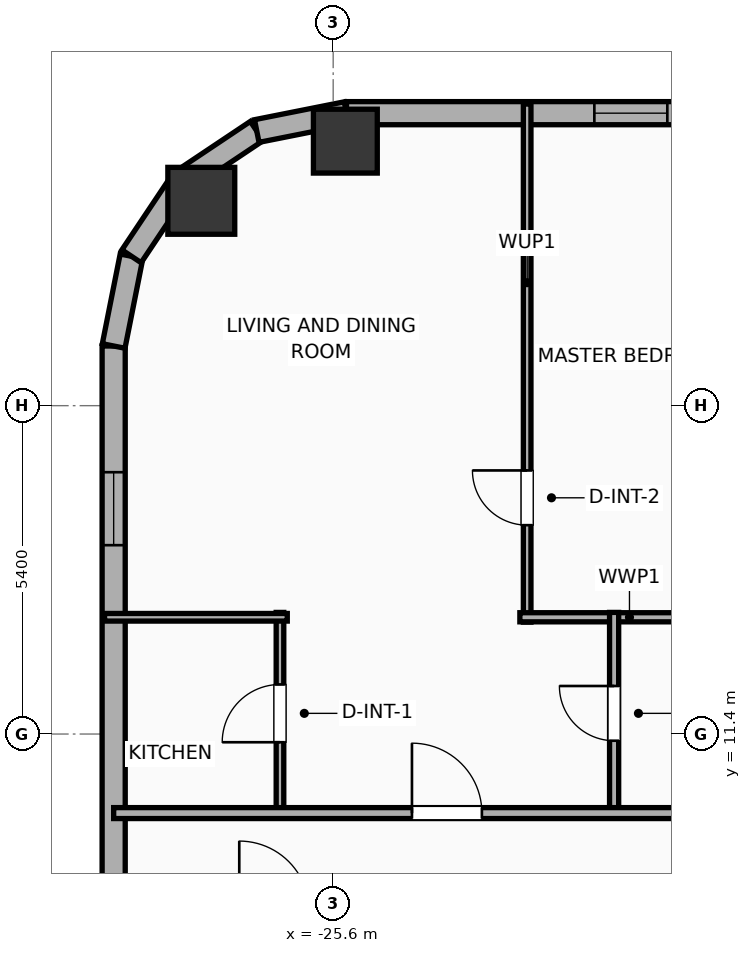
"""IFC4 building model, lengths in metres.
Left out: names, types, materials, properties, quantities, classifications, styles, units other than length and angle.
Written with IfcOpenShell. Run it as: python <this file> out.ifc"""

import sys

from ifc_helpers import new_model, si_unit, direction, frame, frame_2d, origin, origin_2d, place, context, subcontext, project, spatial, rectangle, hollow_rectangle, hollow_circle, extrude, element, fill, save


model = new_model("IFC4")
c1 = context("Model", 3, precision=1e-05, world=origin(), true_north=direction((0.0, 1.0)))
c2 = subcontext(c1, "Body", "Model", "MODEL_VIEW")
j1 = project(units=[si_unit("LENGTHUNIT", "METRE"), si_unit("PLANEANGLEUNIT", "RADIAN")], contexts=[c1])
p1 = place(None, origin())
s1 = spatial("IfcSite", under=j1, at=p1, CompositionType="ELEMENT")
p2 = place(p1, origin())
s2 = spatial("IfcBuilding", under=s1, at=p2, CompositionType="ELEMENT")
p3 = place(p2, frame((0.0, 0.0, 97.5)))
s3 = spatial("IfcBuildingStorey", under=s2, at=p3, CompositionType="ELEMENT", Elevation=97.5)
p4 = place(p3, frame((-25.4, 21.15, 0.0), z_axis=(0.0, 0.0, 1.0), x_axis=(1.0, 0.0, 0.0)))
e1 = element("IfcColumn", 1, at=p4, inside=s3, PredefinedType="COLUMN", context=c2, shape_type="SweptSolid", body=[
    extrude(hollow_rectangle(XDim=1.05, YDim=1.05, WallThickness=0.036, at=origin_2d()), origin(), (0.0, 0.0, 1.0), 3.9),
])
p5 = place(p3, frame((-27.769, 20.169, 0.0), z_axis=(0.0, 0.0, 1.0), x_axis=(1.0, 0.0, 0.0)))
e2 = element("IfcColumn", 2, at=p5, inside=s3, PredefinedType="COLUMN", context=c2, shape_type="SweptSolid", body=[
    extrude(hollow_circle(Radius=0.55, WallThickness=0.036, at=origin_2d()), origin(), (0.0, 0.0, 1.0), 3.9),
])
p6 = place(p3, frame((-29.21, -16.581, 0.0), z_axis=(0.0, 0.0, 1.0), x_axis=(0.0, 1.0, 0.0)))
e3 = element("IfcWall", 3, at=p6, inside=s3, PredefinedType="ELEMENTEDWALL", context=c2, shape_type="SweptSolid", body=[
    extrude(rectangle(XDim=34.363, YDim=0.38, at=frame_2d((17.181, 0.0))), origin(), (0.0, 0.0, 1.0), 3.65),
])
p7 = place(p6, frame((31.087, 0.0, 0.75)))
e4 = element("IfcOpeningElement", 4, at=p7, cuts=e3, PredefinedType="OPENING", context=c2, shape_type="SweptSolid", body=[
    extrude(rectangle(XDim=1.2, YDim=2.05, at=frame_2d((0.6, 1.025))), frame((0.0, 0.2, 0.0), z_axis=(0.0, -1.0, 0.0), x_axis=(1.0, 0.0, 0.0)), (0.0, 0.0, 1.0), 0.4),
])
p8 = place(p6, frame((21.626, 0.0, 0.75)))
e5 = element("IfcOpeningElement", 5, at=p8, cuts=e3, PredefinedType="OPENING", context=c2, shape_type="SweptSolid", body=[
    extrude(rectangle(XDim=1.2, YDim=2.05, at=frame_2d((0.6, 1.025))), frame((0.0, 0.2, 0.0), z_axis=(0.0, -1.0, 0.0), x_axis=(1.0, 0.0, 0.0)), (0.0, 0.0, 1.0), 0.4),
])
p9 = place(p6, frame((10.551, 0.0, 0.75)))
e6 = element("IfcOpeningElement", 6, at=p9, cuts=e3, PredefinedType="OPENING", context=c2, shape_type="SweptSolid", body=[
    extrude(rectangle(XDim=1.2, YDim=2.05, at=frame_2d((0.6, 1.025))), frame((0.0, 0.2, 0.0), z_axis=(0.0, -1.0, 0.0), x_axis=(1.0, 0.0, 0.0)), (0.0, 0.0, 1.0), 0.4),
])
p10 = place(p3, frame((-29.21, 17.781, 0.0), z_axis=(0.0, 0.0, 1.0), x_axis=(0.195086038585, 0.980786132421, 0.0)))
e7 = element("IfcWall", 7, at=p10, inside=s3, PredefinedType="ELEMENTEDWALL", context=c2, shape_type="SweptSolid", body=[
    extrude(rectangle(XDim=1.504, YDim=0.38, at=frame_2d((0.752, 0.0))), origin(), (0.0, 0.0, 1.0), 3.65),
])
p11 = place(p3, frame((-28.917, 19.257, 0.0), z_axis=(0.0, 0.0, 1.0), x_axis=(0.555610286119, 0.831442848281, 0.0)))
e8 = element("IfcWall", 8, at=p11, inside=s3, PredefinedType="ELEMENTEDWALL", context=c2, shape_type="SweptSolid", body=[
    extrude(rectangle(XDim=1.485, YDim=0.38, at=frame_2d((0.743, 0.0))), origin(), (0.0, 0.0, 1.0), 3.65),
])
p12 = place(p3, frame((-28.091, 20.491, 0.0), z_axis=(0.0, 0.0, 1.0), x_axis=(0.831468045563, 0.555572577804, 0.0)))
e9 = element("IfcWall", 9, at=p12, inside=s3, PredefinedType="ELEMENTEDWALL", context=c2, shape_type="SweptSolid", body=[
    extrude(rectangle(XDim=1.485, YDim=0.38, at=frame_2d((0.742, 0.0))), origin(), (0.0, 0.0, 1.0), 3.65),
])
p13 = place(p3, frame((-26.857, 21.316, 0.0), z_axis=(0.0, 0.0, 1.0), x_axis=(0.980755066645, 0.195242155415, 0.0)))
e10 = element("IfcWall", 10, at=p13, inside=s3, PredefinedType="ELEMENTEDWALL", context=c2, shape_type="SweptSolid", body=[
    extrude(rectangle(XDim=1.504, YDim=0.38, at=frame_2d((0.752, 0.0))), origin(), (0.0, 0.0, 1.0), 3.65),
])
p14 = place(p3, frame((-25.381, 21.61, 0.0), z_axis=(0.0, 0.0, 1.0), x_axis=(1.0, 0.0, 0.0)))
e11 = element("IfcWall", 11, at=p14, inside=s3, PredefinedType="ELEMENTEDWALL", context=c2, shape_type="SweptSolid", body=[
    extrude(rectangle(XDim=54.763, YDim=0.38, at=frame_2d((27.381, 0.0))), origin(), (0.0, 0.0, 1.0), 3.65),
])
p15 = place(p14, frame((45.067, 0.0, 0.75)))
e12 = element("IfcOpeningElement", 12, at=p15, cuts=e11, PredefinedType="OPENING", context=c2, shape_type="SweptSolid", body=[
    extrude(rectangle(XDim=2.4, YDim=2.1, at=frame_2d((1.2, 1.05))), frame((0.0, 0.2, 0.0), z_axis=(0.0, -1.0, 0.0), x_axis=(1.0, 0.0, 0.0)), (0.0, 0.0, 1.0), 0.4),
])
p16 = place(p14, frame((4.076, 0.0, 0.75)))
e13 = element("IfcOpeningElement", 13, at=p16, cuts=e11, PredefinedType="OPENING", context=c2, shape_type="SweptSolid", body=[
    extrude(rectangle(XDim=1.2, YDim=2.05, at=frame_2d((0.6, 1.025))), frame((0.0, 0.2, 0.0), z_axis=(0.0, -1.0, 0.0), x_axis=(1.0, 0.0, 0.0)), (0.0, 0.0, 1.0), 0.4),
])
p17 = place(p14, frame((9.395, 0.0, 0.75)))
e14 = element("IfcOpeningElement", 14, at=p17, cuts=e11, PredefinedType="OPENING", context=c2, shape_type="SweptSolid", body=[
    extrude(rectangle(XDim=0.85, YDim=2.05, at=frame_2d((0.425, 1.025))), frame((0.0, 0.2, 0.0), z_axis=(0.0, -1.0, 0.0), x_axis=(1.0, 0.0, 0.0)), (0.0, 0.0, 1.0), 0.4),
])
p18 = place(p14, frame((7.205, 0.0, 0.75)))
e15 = element("IfcOpeningElement", 15, at=p18, cuts=e11, PredefinedType="OPENING", context=c2, shape_type="SweptSolid", body=[
    extrude(rectangle(XDim=1.2, YDim=2.05, at=frame_2d((0.6, 1.025))), frame((0.0, 0.2, 0.0), z_axis=(0.0, -1.0, 0.0), x_axis=(1.0, 0.0, 0.0)), (0.0, 0.0, 1.0), 0.4),
])
p19 = place(p14, frame((13.676, 0.0, 0.75)))
e16 = element("IfcOpeningElement", 16, at=p19, cuts=e11, PredefinedType="OPENING", context=c2, shape_type="SweptSolid", body=[
    extrude(rectangle(XDim=1.2, YDim=2.05, at=frame_2d((0.6, 1.025))), frame((0.0, 0.2, 0.0), z_axis=(0.0, -1.0, 0.0), x_axis=(1.0, 0.0, 0.0)), (0.0, 0.0, 1.0), 0.4),
])
p20 = place(p14, frame((17.136, 0.0, 0.75)))
e17 = element("IfcOpeningElement", 17, at=p20, cuts=e11, PredefinedType="OPENING", context=c2, shape_type="SweptSolid", body=[
    extrude(rectangle(XDim=1.2, YDim=2.05, at=frame_2d((0.6, 1.025))), frame((0.0, 0.2, 0.0), z_axis=(0.0, -1.0, 0.0), x_axis=(1.0, 0.0, 0.0)), (0.0, 0.0, 1.0), 0.4),
])
p21 = place(p14, frame((22.656, 0.0, 0.75)))
e18 = element("IfcOpeningElement", 18, at=p21, cuts=e11, PredefinedType="OPENING", context=c2, shape_type="SweptSolid", body=[
    extrude(rectangle(XDim=1.2, YDim=2.05, at=frame_2d((0.6, 1.025))), frame((0.0, 0.2, 0.0), z_axis=(0.0, -1.0, 0.0), x_axis=(1.0, 0.0, 0.0)), (0.0, 0.0, 1.0), 0.4),
])
p22 = place(p14, frame((29.443, 0.0, 0.75)))
e19 = element("IfcOpeningElement", 19, at=p22, cuts=e11, PredefinedType="OPENING", context=c2, shape_type="SweptSolid", body=[
    extrude(rectangle(XDim=1.2, YDim=2.05, at=frame_2d((0.6, 1.025))), frame((0.0, 0.2, 0.0), z_axis=(0.0, -1.0, 0.0), x_axis=(1.0, 0.0, 0.0)), (0.0, 0.0, 1.0), 0.4),
])
p23 = place(p14, frame((26.348, 0.0, 0.75)))
e20 = element("IfcOpeningElement", 20, at=p23, cuts=e11, PredefinedType="OPENING", context=c2, shape_type="SweptSolid", body=[
    extrude(rectangle(XDim=1.2, YDim=2.05, at=frame_2d((0.6, 1.025))), frame((0.0, 0.2, 0.0), z_axis=(0.0, -1.0, 0.0), x_axis=(1.0, 0.0, 0.0)), (0.0, 0.0, 1.0), 0.4),
])
p24 = place(p14, frame((33.596, 0.0, 0.75)))
e21 = element("IfcOpeningElement", 21, at=p24, cuts=e11, PredefinedType="OPENING", context=c2, shape_type="SweptSolid", body=[
    extrude(rectangle(XDim=1.2, YDim=2.05, at=frame_2d((0.6, 1.025))), frame((0.0, 0.2, 0.0), z_axis=(0.0, -1.0, 0.0), x_axis=(1.0, 0.0, 0.0)), (0.0, 0.0, 1.0), 0.4),
])
p25 = place(p14, frame((36.014, 0.0, 0.75)))
e22 = element("IfcOpeningElement", 22, at=p25, cuts=e11, PredefinedType="OPENING", context=c2, shape_type="SweptSolid", body=[
    extrude(rectangle(XDim=1.2, YDim=2.05, at=frame_2d((0.6, 1.025))), frame((0.0, 0.2, 0.0), z_axis=(0.0, -1.0, 0.0), x_axis=(1.0, 0.0, 0.0)), (0.0, 0.0, 1.0), 0.4),
])
p26 = place(p14, frame((40.814, 0.0, 0.75)))
e23 = element("IfcOpeningElement", 23, at=p26, cuts=e11, PredefinedType="OPENING", context=c2, shape_type="SweptSolid", body=[
    extrude(rectangle(XDim=1.2, YDim=2.05, at=frame_2d((0.6, 1.025))), frame((0.0, 0.2, 0.0), z_axis=(0.0, -1.0, 0.0), x_axis=(1.0, 0.0, 0.0)), (0.0, 0.0, 1.0), 0.4),
])
p27 = place(p14, frame((49.385, 0.0, 0.75)))
e24 = element("IfcOpeningElement", 24, at=p27, cuts=e11, PredefinedType="OPENING", context=c2, shape_type="SweptSolid", body=[
    extrude(rectangle(XDim=1.2, YDim=2.05, at=frame_2d((0.6, 1.025))), frame((0.0, 0.2, 0.0), z_axis=(0.0, -1.0, 0.0), x_axis=(1.0, 0.0, 0.0)), (0.0, 0.0, 1.0), 0.4),
])
p28 = place(p14, frame((52.181, 0.0, 0.75)))
e25 = element("IfcOpeningElement", 25, at=p28, cuts=e11, PredefinedType="OPENING", context=c2, shape_type="SweptSolid", body=[
    extrude(rectangle(XDim=1.2, YDim=2.05, at=frame_2d((0.6, 1.025))), frame((0.0, 0.2, 0.0), z_axis=(0.0, -1.0, 0.0), x_axis=(1.0, 0.0, 0.0)), (0.0, 0.0, 1.0), 0.4),
])
p29 = place(p3, frame((-22.41, 13.24, 0.0), z_axis=(0.0, 0.0, 1.0), x_axis=(0.0, 1.0, 0.0)))
e26 = element("IfcWall", 26, at=p29, inside=s3, PredefinedType="PARTITIONING", context=c2, shape_type="SweptSolid", body=[
    extrude(rectangle(XDim=8.52, YDim=0.125, at=frame_2d((4.26, 0.0))), origin(), (0.0, 0.0, 1.0), 3.65),
])
p30 = place(p29, frame((1.595, 0.0, 0.0)))
e27 = element("IfcOpeningElement", 27, at=p30, cuts=e26, PredefinedType="OPENING", context=c2, shape_type="SweptSolid", body=[
    extrude(rectangle(XDim=0.9, YDim=2.05, at=frame_2d((0.45, 1.025))), frame((0.0, 0.073, 0.0), z_axis=(0.0, -1.0, 0.0), x_axis=(1.0, 0.0, 0.0)), (0.0, 0.0, 1.0), 0.145),
])
p31 = place(p3, frame((-22.53, 13.32, 0.0), z_axis=(0.0, 0.0, 1.0), x_axis=(1.0, 0.0, 0.0)))
e28 = element("IfcWall", 28, at=p31, inside=s3, PredefinedType="PLUMBINGWALL", context=c2, shape_type="SweptSolid", body=[
    extrude(rectangle(XDim=3.605, YDim=0.15, at=frame_2d((1.802, 0.0))), origin(), (0.0, 0.0, 1.0), 3.65),
])
p32 = place(p3, frame((-26.475, 10.08, 0.0), z_axis=(0.0, 0.0, 1.0), x_axis=(0.0, 1.0, 0.0)))
e29 = element("IfcWall", 29, at=p32, inside=s3, PredefinedType="PARTITIONING", context=c2, shape_type="SweptSolid", body=[
    extrude(rectangle(XDim=3.32, YDim=0.125, at=frame_2d((1.66, 0.0))), origin(), (0.0, 0.0, 1.0), 3.65),
])
p33 = place(p32, frame((1.185, 0.0, 0.0)))
e30 = element("IfcOpeningElement", 30, at=p33, cuts=e29, PredefinedType="OPENING", context=c2, shape_type="SweptSolid", body=[
    extrude(rectangle(XDim=0.95, YDim=2.05, at=frame_2d((0.475, 1.025))), frame((0.0, 0.073, 0.0), z_axis=(0.0, -1.0, 0.0), x_axis=(1.0, 0.0, 0.0)), (0.0, 0.0, 1.0), 0.145),
])
p34 = place(p3, frame((-29.36, 13.32, 0.0), z_axis=(0.0, 0.0, 1.0), x_axis=(1.0, 0.0, 0.0)))
e31 = element("IfcWall", 31, at=p34, inside=s3, PredefinedType="PARTITIONING", context=c2, shape_type="SweptSolid", body=[
    extrude(rectangle(XDim=3.005, YDim=0.125, at=frame_2d((1.502, 0.0))), origin(), (0.0, 0.0, 1.0), 3.65),
])
p35 = place(p3, frame((-20.98, 10.08, 0.0), z_axis=(0.0, 0.0, 1.0), x_axis=(0.0, 1.0, 0.0)))
e32 = element("IfcWall", 32, at=p35, inside=s3, PredefinedType="PLUMBINGWALL", context=c2, shape_type="SweptSolid", body=[
    extrude(rectangle(XDim=3.32, YDim=0.15, at=frame_2d((1.66, 0.0))), origin(), (0.0, 0.0, 1.0), 3.65),
])
p36 = place(p35, frame((1.21, 0.0, 0.0)))
e33 = element("IfcOpeningElement", 33, at=p36, cuts=e32, PredefinedType="OPENING", context=c2, shape_type="SweptSolid", body=[
    extrude(rectangle(XDim=0.9, YDim=2.05, at=frame_2d((0.45, 1.025))), frame((0.0, 0.085, 0.0), z_axis=(0.0, -1.0, 0.0), x_axis=(1.0, 0.0, 0.0)), (0.0, 0.0, 1.0), 0.17),
])
p37 = place(p3, frame((-29.21, 10.1, 0.0), z_axis=(0.0, 0.0, 1.0), x_axis=(1.0, 0.0, 0.0)))
e34 = element("IfcWall", 34, at=p37, inside=s3, PredefinedType="PARTITIONING", context=c2, shape_type="SweptSolid", body=[
    extrude(rectangle(XDim=62.42, YDim=0.18, at=frame_2d((31.21, 0.0))), origin(), (0.0, 0.0, 1.0), 3.65),
])
p38 = place(p37, frame((4.906, 0.0, 0.0)))
e35 = element("IfcOpeningElement", 35, at=p38, cuts=e34, PredefinedType="OPENING", context=c2, shape_type="SweptSolid", body=[
    extrude(rectangle(XDim=1.15, YDim=2.05, at=frame_2d((0.575, 1.025))), frame((0.0, 0.1, 0.0), z_axis=(0.0, -1.0, 0.0), x_axis=(1.0, 0.0, 0.0)), (0.0, 0.0, 1.0), 0.2),
])
p39 = place(p37, frame((14.812, 0.0, 0.0)))
e36 = element("IfcOpeningElement", 36, at=p39, cuts=e34, PredefinedType="OPENING", context=c2, shape_type="SweptSolid", body=[
    extrude(rectangle(XDim=1.15, YDim=2.05, at=frame_2d((0.575, 1.025))), frame((0.0, 0.1, 0.0), z_axis=(0.0, -1.0, 0.0), x_axis=(1.0, 0.0, 0.0)), (0.0, 0.0, 1.0), 0.2),
])
p40 = place(p37, frame((24.406, 0.0, 0.0)))
e37 = element("IfcOpeningElement", 37, at=p40, cuts=e34, PredefinedType="OPENING", context=c2, shape_type="SweptSolid", body=[
    extrude(rectangle(XDim=1.15, YDim=2.05, at=frame_2d((0.575, 1.025))), frame((0.0, 0.1, 0.0), z_axis=(0.0, -1.0, 0.0), x_axis=(1.0, 0.0, 0.0)), (0.0, 0.0, 1.0), 0.2),
])
p41 = place(p37, frame((33.981, 0.0, 0.0)))
e38 = element("IfcOpeningElement", 38, at=p41, cuts=e34, PredefinedType="OPENING", context=c2, shape_type="SweptSolid", body=[
    extrude(rectangle(XDim=1.15, YDim=2.05, at=frame_2d((0.575, 1.025))), frame((0.0, 0.1, 0.0), z_axis=(0.0, -1.0, 0.0), x_axis=(1.0, 0.0, 0.0)), (0.0, 0.0, 1.0), 0.2),
])
p42 = place(p37, frame((43.138, 0.0, 0.0)))
e39 = element("IfcOpeningElement", 39, at=p42, cuts=e34, PredefinedType="OPENING", context=c2, shape_type="SweptSolid", body=[
    extrude(rectangle(XDim=1.15, YDim=2.05, at=frame_2d((0.575, 1.025))), frame((0.0, 0.1, 0.0), z_axis=(0.0, -1.0, 0.0), x_axis=(1.0, 0.0, 0.0)), (0.0, 0.0, 1.0), 0.2),
])
p43 = place(p37, frame((51.777, 0.0, 0.0)))
e40 = element("IfcOpeningElement", 40, at=p43, cuts=e34, PredefinedType="OPENING", context=c2, shape_type="SweptSolid", body=[
    extrude(rectangle(XDim=0.9, YDim=2.05, at=frame_2d((0.45, 1.025))), frame((0.0, 0.1, 0.0), z_axis=(0.0, -1.0, 0.0), x_axis=(1.0, 0.0, 0.0)), (0.0, 0.0, 1.0), 0.2),
])
p44 = place(p37, frame((58.718, 0.0, 0.0)))
e41 = element("IfcOpeningElement", 41, at=p44, cuts=e34, PredefinedType="OPENING", context=c2, shape_type="SweptSolid", body=[
    extrude(rectangle(XDim=0.9, YDim=2.05, at=frame_2d((0.45, 1.025))), frame((0.0, 0.1, 0.0), z_axis=(0.0, -1.0, 0.0), x_axis=(1.0, 0.0, 0.0)), (0.0, 0.0, 1.0), 0.2),
])
p45 = place(p7, origin())
e42 = element("IfcWindow", 42, at=p45, inside=s3, PartitioningType="SINGLE_PANEL", PredefinedType="WINDOW", context=c2, shape_type="SweptSolid", body=[
    extrude(rectangle(XDim=1.2, YDim=2.05, at=frame_2d((0.6, 1.025))), frame((0.0, 0.03, 0.0), z_axis=(0.0, -1.0, 0.0), x_axis=(1.0, 0.0, 0.0)), (0.0, 0.0, 1.0), 0.06),
])
fill(e4, e42)
p46 = place(p16, origin())
e43 = element("IfcWindow", 43, at=p46, inside=s3, PartitioningType="SINGLE_PANEL", PredefinedType="WINDOW", context=c2, shape_type="SweptSolid", body=[
    extrude(rectangle(XDim=1.2, YDim=2.05, at=frame_2d((0.6, 1.025))), frame((0.0, 0.03, 0.0), z_axis=(0.0, -1.0, 0.0), x_axis=(1.0, 0.0, 0.0)), (0.0, 0.0, 1.0), 0.06),
])
fill(e13, e43)
p47 = place(p30, origin())
e44 = element("IfcDoor", 44, at=p47, inside=s3, OperationType="SINGLE_SWING_RIGHT", PredefinedType="DOOR", context=c2, shape_type="SweptSolid", body=[
    extrude(rectangle(XDim=0.9, YDim=2.05, at=frame_2d((0.45, 1.025))), frame((0.0, 0.025, 0.0), z_axis=(0.0, -1.0, 0.0), x_axis=(1.0, 0.0, 0.0)), (0.0, 0.0, 1.0), 0.05),
])
fill(e27, e44)
p48 = place(p33, origin())
e45 = element("IfcDoor", 45, at=p48, inside=s3, OperationType="SINGLE_SWING_LEFT", PredefinedType="DOOR", context=c2, shape_type="SweptSolid", body=[
    extrude(rectangle(XDim=0.95, YDim=2.05, at=frame_2d((0.475, 1.025))), frame((0.0, 0.025, 0.0), z_axis=(0.0, -1.0, 0.0), x_axis=(1.0, 0.0, 0.0)), (0.0, 0.0, 1.0), 0.05),
])
fill(e30, e45)
p49 = place(p36, origin())
e46 = element("IfcDoor", 46, at=p49, inside=s3, OperationType="SINGLE_SWING_RIGHT", PredefinedType="DOOR", context=c2, shape_type="SweptSolid", body=[
    extrude(rectangle(XDim=0.9, YDim=2.05, at=frame_2d((0.45, 1.025))), frame((0.0, 0.025, 0.0), z_axis=(0.0, -1.0, 0.0), x_axis=(1.0, 0.0, 0.0)), (0.0, 0.0, 1.0), 0.05),
])
fill(e33, e46)
p50 = place(p38, origin())
e47 = element("IfcDoor", 47, at=p50, inside=s3, OperationType="SINGLE_SWING_LEFT", PredefinedType="DOOR", context=c2, shape_type="SweptSolid", body=[
    extrude(rectangle(XDim=1.15, YDim=2.05, at=frame_2d((0.575, 1.025))), frame((0.0, 0.025, 0.0), z_axis=(0.0, -1.0, 0.0), x_axis=(1.0, 0.0, 0.0)), (0.0, 0.0, 1.0), 0.05),
])
fill(e35, e47)
save(model, sys.argv[1])
